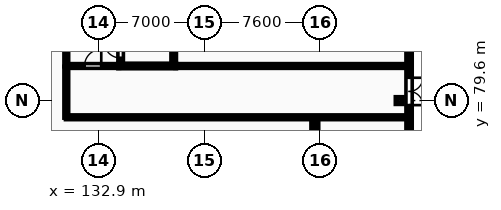
"""IFC4 building model, lengths in metres.
Left out: names, types, materials, properties, quantities, classifications, styles, units other than length and angle.
Written with IfcOpenShell. Run it as: python <this file> out.ifc"""

import sys

from ifc_helpers import new_model, si_unit, direction, frame, frame_2d, origin, origin_2d, place, context, subcontext, project, spatial, rectangle, i_section, extrude, element, fill, save


model = new_model("IFC4")
c1 = context("Model", 3, precision=1e-05, world=origin(), true_north=direction((0.0, 1.0)))
c2 = subcontext(c1, "Body", "Model", "MODEL_VIEW")
j1 = project(units=[si_unit("LENGTHUNIT", "METRE"), si_unit("PLANEANGLEUNIT", "RADIAN")], contexts=[c1])
p1 = place(None, origin())
s1 = spatial("IfcSite", under=j1, at=p1, CompositionType="ELEMENT")
p2 = place(p1, origin())
s2 = spatial("IfcBuilding", under=s1, at=p2, CompositionType="ELEMENT")
p3 = place(p2, origin())
s3 = spatial("IfcBuildingStorey", under=s2, at=p3, CompositionType="ELEMENT", Elevation=0.0)
for number, where, z_axis, x_axis in (
    (1, (147.15, 78.0, 0.0), (0.0, 0.0, 1.0), (1.0, 0.0, 0.0)),
    (2, (152.7, 79.6, 0.0), (0.0, 0.0, 1.0), (1.0, 0.0, 0.0)),
):
    element("IfcColumn", number, at=place(p3, frame(where, z_axis=z_axis, x_axis=x_axis)), inside=s3, PredefinedType="COLUMN", context=c2, shape_type="SweptSolid", body=[
        extrude(i_section(OverallWidth=0.399, OverallDepth=0.394, WebThickness=0.023, FlangeThickness=0.037, FilletRadius=0.015, at=origin_2d()), origin(), (0.0, 0.0, 1.0), 5.4),
    ])
p4 = place(p3, frame((153.35, -26.5, 0.0), z_axis=(0.0, 0.0, 1.0), x_axis=(0.0, 1.0, 0.0)))
e3 = element("IfcWall", 3, at=p4, inside=s3, PredefinedType="STANDARD", context=c2, shape_type="SweptSolid", body=[
    extrude(rectangle(XDim=135.7, YDim=0.3, at=frame_2d((67.85, 0.0))), origin(), (0.0, 0.0, 1.0), 5.1),
])
p5 = place(p4, frame((60.8, 0.0, 0.0)))
e4 = element("IfcOpeningElement", 4, at=p5, cuts=e3, PredefinedType="OPENING", context=c2, shape_type="SweptSolid", body=[
    extrude(rectangle(XDim=7.2, YDim=3.2, at=frame_2d((3.6, 1.6))), frame((0.0, 0.16, 0.0), z_axis=(0.0, -1.0, 0.0), x_axis=(1.0, 0.0, 0.0)), (0.0, 0.0, 1.0), 0.32),
])
p6 = place(p4, frame((70.1, 0.0, 0.0)))
e5 = element("IfcOpeningElement", 5, at=p6, cuts=e3, PredefinedType="OPENING", context=c2, shape_type="SweptSolid", body=[
    extrude(rectangle(XDim=1.8, YDim=2.2, at=frame_2d((0.9, 1.1))), frame((0.0, 0.16, 0.0), z_axis=(0.0, -1.0, 0.0), x_axis=(1.0, 0.0, 0.0)), (0.0, 0.0, 1.0), 0.32),
])
p7 = place(p4, frame((77.5, 0.0, 0.0)))
e6 = element("IfcOpeningElement", 6, at=p7, cuts=e3, PredefinedType="OPENING", context=c2, shape_type="SweptSolid", body=[
    extrude(rectangle(XDim=4.2, YDim=3.6, at=frame_2d((2.1, 1.8))), frame((0.0, 0.16, 0.0), z_axis=(0.0, -1.0, 0.0), x_axis=(1.0, 0.0, 0.0)), (0.0, 0.0, 1.0), 0.32),
])
p8 = place(p4, frame((11.0, 0.0, 0.0)))
e7 = element("IfcOpeningElement", 7, at=p8, cuts=e3, PredefinedType="OPENING", context=c2, shape_type="SweptSolid", body=[
    extrude(rectangle(XDim=1.8, YDim=2.2, at=frame_2d((0.9, 1.1))), frame((0.0, 0.16, 0.0), z_axis=(0.0, -1.0, 0.0), x_axis=(1.0, 0.0, 0.0)), (0.0, 0.0, 1.0), 0.32),
])
p9 = place(p4, frame((105.8, 0.0, 0.0)))
e8 = element("IfcOpeningElement", 8, at=p9, cuts=e3, PredefinedType="OPENING", context=c2, shape_type="SweptSolid", body=[
    extrude(rectangle(XDim=1.8, YDim=2.2, at=frame_2d((0.9, 1.1))), frame((0.0, 0.16, 0.0), z_axis=(0.0, -1.0, 0.0), x_axis=(1.0, 0.0, 0.0)), (0.0, 0.0, 1.0), 0.32),
])
p10 = place(p3, frame((134.375, 82.0, 0.0), z_axis=(0.0, 0.0, 1.0), x_axis=(0.0, 1.0, 0.0)))
e9 = element("IfcWall", 9, at=p10, inside=s3, PredefinedType="SHEAR", context=c2, shape_type="SweptSolid", body=[
    extrude(rectangle(XDim=7.6, YDim=0.25, at=frame_2d((3.8, 0.0))), origin(), (0.0, 0.0, 1.0), 5.4),
])
p11 = place(p10, frame((0.4, 0.0, 0.0)))
e10 = element("IfcOpeningElement", 10, at=p11, cuts=e9, PredefinedType="OPENING", context=c2, shape_type="SweptSolid", body=[
    extrude(rectangle(XDim=1.1, YDim=2.1, at=frame_2d((0.55, 1.05))), frame((0.0, 0.135, 0.0), z_axis=(0.0, -1.0, 0.0), x_axis=(1.0, 0.0, 0.0)), (0.0, 0.0, 1.0), 0.27),
])
p12 = place(p3, frame((137.865, 82.0, 0.0), z_axis=(0.0, 0.0, 1.0), x_axis=(0.0, 1.0, 0.0)))
e11 = element("IfcWall", 11, at=p12, inside=s3, PredefinedType="SHEAR", context=c2, shape_type="SweptSolid", body=[
    extrude(rectangle(XDim=7.6, YDim=0.25, at=frame_2d((3.8, 0.0))), origin(), (0.0, 0.0, 1.0), 5.4),
])
p13 = place(p3, frame((134.25, 81.875, 0.0), z_axis=(0.0, 0.0, 1.0), x_axis=(1.0, 0.0, 0.0)))
e12 = element("IfcWall", 12, at=p13, inside=s3, PredefinedType="SHEAR", context=c2, shape_type="SweptSolid", body=[
    extrude(rectangle(XDim=3.74, YDim=0.25, at=frame_2d((1.87, 0.0))), origin(), (0.0, 0.0, 1.0), 5.4),
])
p14 = place(p3, frame((130.8, 81.875, 0.0), z_axis=(0.0, 0.0, 1.0), x_axis=(0.0, 1.0, 0.0)))
e13 = element("IfcWall", 13, at=p14, inside=s3, PredefinedType="PARTITIONING", context=c2, shape_type="SweptSolid", body=[
    extrude(rectangle(XDim=4.825, YDim=0.2, at=frame_2d((2.413, 0.0))), origin(), (0.0, 0.0, 1.0), 5.1),
])
p15 = place(p14, frame((1.6, 0.0, 0.0)))
e14 = element("IfcOpeningElement", 14, at=p15, cuts=e13, PredefinedType="OPENING", context=c2, shape_type="SweptSolid", body=[
    extrude(rectangle(XDim=1.1, YDim=2.15, at=frame_2d((0.55, 1.075))), frame((0.0, 0.11, 0.0), z_axis=(0.0, -1.0, 0.0), x_axis=(1.0, 0.0, 0.0)), (0.0, 0.0, 1.0), 0.22),
])
p16 = place(p3, frame((130.9, 81.875, 0.0), z_axis=(0.0, 0.0, 1.0), x_axis=(1.0, 0.0, 0.0)))
e15 = element("IfcWall", 15, at=p16, inside=s3, PredefinedType="PARTITIONING", context=c2, shape_type="SweptSolid", body=[
    extrude(rectangle(XDim=3.35, YDim=0.2, at=frame_2d((1.675, 0.0))), origin(), (0.0, 0.0, 1.0), 5.1),
])
p17 = place(p16, frame((1.1, 0.0, 0.0)))
e16 = element("IfcOpeningElement", 16, at=p17, cuts=e15, PredefinedType="OPENING", context=c2, shape_type="SweptSolid", body=[
    extrude(rectangle(XDim=1.1, YDim=2.1, at=frame_2d((0.55, 1.05))), frame((0.0, 0.11, 0.0), z_axis=(0.0, -1.0, 0.0), x_axis=(1.0, 0.0, 0.0)), (0.0, 0.0, 1.0), 0.22),
])
p18 = place(p3, frame((130.8, 78.5, 0.0), z_axis=(0.0, 0.0, 1.0), x_axis=(1.0, 0.0, 0.0)))
e17 = element("IfcWall", 17, at=p18, inside=s3, PredefinedType="PARTITIONING", context=c2, shape_type="SweptSolid", body=[
    extrude(rectangle(XDim=22.4, YDim=0.2, at=frame_2d((11.2, 0.0))), origin(), (0.0, 0.0, 1.0), 5.1),
])
p19 = place(p3, frame((138.0, 81.875, 0.0), z_axis=(0.0, 0.0, 1.0), x_axis=(1.0, 0.0, 0.0)))
e18 = element("IfcWall", 18, at=p19, inside=s3, PredefinedType="PARTITIONING", context=c2, shape_type="SweptSolid", body=[
    extrude(rectangle(XDim=15.2, YDim=0.2, at=frame_2d((7.6, 0.0))), origin(), (0.0, 0.0, 1.0), 5.1),
])
p20 = place(p3, frame((130.8, 78.5, 0.0), z_axis=(0.0, 0.0, 1.0), x_axis=(0.0, 1.0, 0.0)))
e19 = element("IfcWall", 19, at=p20, inside=s3, PredefinedType="PARTITIONING", context=c2, shape_type="SweptSolid", body=[
    extrude(rectangle(XDim=3.3, YDim=0.2, at=frame_2d((1.65, 0.0))), origin(), (0.0, 0.0, 1.0), 5.1),
])
p21 = place(p9, frame((1.8, 0.0, 0.0), z_axis=(0.0, 0.0, 1.0), x_axis=(-1.0, 0.0, 0.0)))
e20 = element("IfcDoor", 20, at=p21, inside=s3, OperationType="DOUBLE_DOOR_SINGLE_SWING", PredefinedType="DOOR", context=c2, shape_type="SweptSolid", body=[
    extrude(rectangle(XDim=1.8, YDim=2.2, at=frame_2d((0.9, 1.1))), frame((0.0, 0.025, 0.0), z_axis=(0.0, -1.0, 0.0), x_axis=(1.0, 0.0, 0.0)), (0.0, 0.0, 1.0), 0.05),
])
fill(e8, e20)
p22 = place(p11, origin())
e21 = element("IfcDoor", 21, at=p22, inside=s3, OperationType="SINGLE_SWING_RIGHT", PredefinedType="DOOR", context=c2, shape_type="SweptSolid", body=[
    extrude(rectangle(XDim=1.1, YDim=2.1, at=frame_2d((0.55, 1.05))), frame((0.0, 0.025, 0.0), z_axis=(0.0, -1.0, 0.0), x_axis=(1.0, 0.0, 0.0)), (0.0, 0.0, 1.0), 0.05),
])
fill(e10, e21)
p23 = place(p17, origin())
e22 = element("IfcDoor", 22, at=p23, inside=s3, OperationType="SINGLE_SWING_RIGHT", PredefinedType="DOOR", context=c2, shape_type="SweptSolid", body=[
    extrude(rectangle(XDim=1.1, YDim=2.1, at=frame_2d((0.55, 1.05))), frame((0.0, 0.025, 0.0), z_axis=(0.0, -1.0, 0.0), x_axis=(1.0, 0.0, 0.0)), (0.0, 0.0, 1.0), 0.05),
])
fill(e16, e22)
save(model, sys.argv[1])
